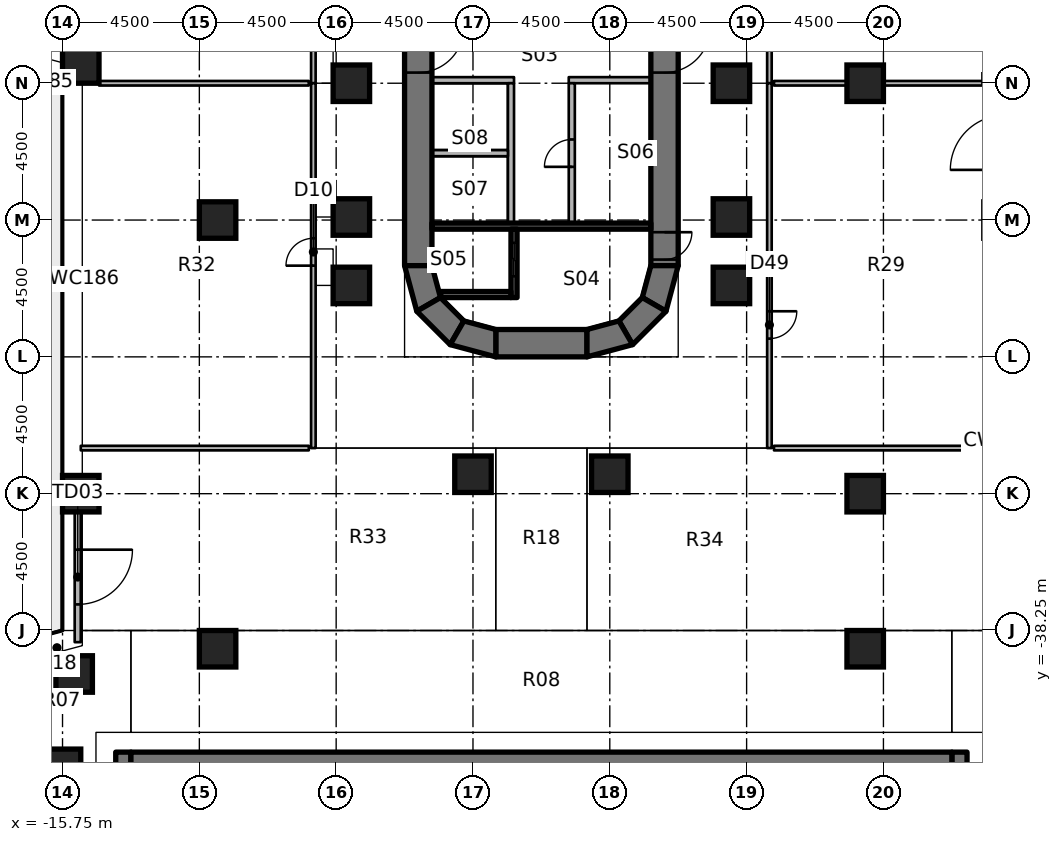
"""IFC4 building model, lengths in metres.
Left out: names, types, materials, properties, quantities, classifications, styles, units other than length and angle.
Written with IfcOpenShell. Run it as: python <this file> out.ifc"""

import sys

from ifc_helpers import new_model, si_unit, direction, frame, frame_2d, origin, origin_2d, place, context, subcontext, project, spatial, polyline, rectangle, outline, extrude, element, fill, save


model = new_model("IFC4")
c1 = context("Model", 3, precision=1e-05, world=origin(), true_north=direction((0.0, 1.0)))
c2 = subcontext(c1, "Body", "Model", "MODEL_VIEW")
j1 = project(units=[si_unit("LENGTHUNIT", "METRE"), si_unit("PLANEANGLEUNIT", "RADIAN")], contexts=[c1])
p1 = place(None, origin())
s1 = spatial("IfcSite", under=j1, at=p1, CompositionType="ELEMENT")
p2 = place(p1, origin())
s2 = spatial("IfcBuilding", under=s1, at=p2, CompositionType="ELEMENT")
p3 = place(p2, frame((0.0, 0.0, 17.0)))
s3 = spatial("IfcBuildingStorey", under=s2, at=p3, CompositionType="ELEMENT", Elevation=17.0)
for number, where, z_axis, x_axis in (
    (1, (-15.75, -42.75, 0.0), (0.0, 0.0, 1.0), (1.0, 0.0, 0.0)),
    (2, (-15.367, -39.68, 0.0), (0.0, 0.0, 1.0), (1.0, 0.0, 0.0)),
    (3, (-15.15, -33.75, 0.0), (0.0, 0.0, 1.0), (1.0, 0.0, 0.0)),
    (4, (-15.15, -19.65, 0.0), (0.0, 0.0, 1.0), (1.0, 0.0, 0.0)),
    (5, (-10.65, -38.85, 0.0), (0.0, 0.0, 1.0), (1.0, 0.0, 0.0)),
    (6, (-10.65, -24.75, 0.0), (0.0, 0.0, 1.0), (1.0, 0.0, 0.0)),
    (7, (-6.25, -26.9, 0.0), (0.0, 0.0, 1.0), (1.0, 0.0, 0.0)),
    (8, (-6.25, -24.65, 0.0), (0.0, 0.0, 1.0), (1.0, 0.0, 0.0)),
    (9, (-6.25, -20.25, 0.0), (0.0, 0.0, 1.0), (1.0, 0.0, 0.0)),
    (10, (-2.25, -33.11, 0.0), (0.0, 0.0, 1.0), (1.0, 0.0, 0.0)),
    (11, (2.25, -33.11, 0.0), (0.0, 0.0, 1.0), (1.0, 0.0, 0.0)),
    (12, (6.25, -26.9, 0.0), (0.0, 0.0, 1.0), (1.0, 0.0, 0.0)),
    (13, (6.25, -24.65, 0.0), (0.0, 0.0, 1.0), (1.0, 0.0, 0.0)),
    (14, (6.25, -20.25, 0.0), (0.0, 0.0, 1.0), (1.0, 0.0, 0.0)),
    (15, (10.65, -38.85, 0.0), (0.0, 0.0, 1.0), (1.0, 0.0, 0.0)),
    (16, (10.65, -33.75, 0.0), (0.0, 0.0, 1.0), (1.0, 0.0, 0.0)),
    (17, (10.65, -20.25, 0.0), (0.0, 0.0, 1.0), (1.0, 0.0, 0.0)),
):
    element("IfcColumn", number, at=place(p3, frame(where, z_axis=z_axis, x_axis=x_axis)), inside=s3, PredefinedType="COLUMN", context=c2, shape_type="SweptSolid", body=[
        extrude(rectangle(XDim=1.2, YDim=1.2, at=origin_2d()), origin(), (0.0, 0.0, 1.0), 4.55),
    ])
p4 = place(p3, frame((-4.05, -11.25, 0.0), z_axis=(0.0, 0.0, 1.0), x_axis=(0.0, -1.0, 0.0)))
e18 = element("IfcWall", 18, at=p4, inside=s3, PredefinedType="SHEAR", context=c2, shape_type="SweptSolid", body=[
    extrude(rectangle(XDim=15.0, YDim=0.9, at=frame_2d((7.5, 0.0))), origin(), (0.0, 0.0, 1.0), 5.0),
])
p5 = place(p4, frame((7.15, 0.0, 0.0)))
e19 = element("IfcOpeningElement", 19, at=p5, cuts=e18, PredefinedType="OPENING", context=c2, shape_type="SweptSolid", body=[
    extrude(rectangle(XDim=1.5, YDim=2.3, at=frame_2d((0.75, 1.15))), frame((0.0, 0.46, 0.0), z_axis=(0.0, -1.0, 0.0), x_axis=(1.0, 0.0, 0.0)), (0.0, 0.0, 1.0), 0.92),
])
p6 = place(p4, frame((5.55, 0.0, 0.0)))
e20 = element("IfcOpeningElement", 20, at=p6, cuts=e18, PredefinedType="OPENING", context=c2, shape_type="SweptSolid", body=[
    extrude(rectangle(XDim=1.2, YDim=2.1, at=frame_2d((0.6, 1.05))), frame((0.0, 0.46, 0.0), z_axis=(0.0, -1.0, 0.0), x_axis=(1.0, 0.0, 0.0)), (0.0, 0.0, 1.0), 0.92),
])
p7 = place(p3, frame((4.05, -11.25, 0.0), z_axis=(0.0, 0.0, 1.0), x_axis=(0.0, -1.0, 0.0)))
e21 = element("IfcWall", 21, at=p7, inside=s3, PredefinedType="SHEAR", context=c2, shape_type="SweptSolid", body=[
    extrude(rectangle(XDim=15.0, YDim=0.9, at=frame_2d((7.5, 0.0))), origin(), (0.0, 0.0, 1.0), 5.0),
])
p8 = place(p7, frame((7.15, 0.0, 0.0)))
e22 = element("IfcOpeningElement", 22, at=p8, cuts=e21, PredefinedType="OPENING", context=c2, shape_type="SweptSolid", body=[
    extrude(rectangle(XDim=1.5, YDim=2.3, at=frame_2d((0.75, 1.15))), frame((0.0, 0.46, 0.0), z_axis=(0.0, -1.0, 0.0), x_axis=(1.0, 0.0, 0.0)), (0.0, 0.0, 1.0), 0.92),
])
p9 = place(p7, frame((13.9, 0.0, 0.0)))
e23 = element("IfcOpeningElement", 23, at=p9, cuts=e21, PredefinedType="OPENING", context=c2, shape_type="SweptSolid", body=[
    extrude(rectangle(XDim=0.9, YDim=2.1, at=frame_2d((0.45, 1.05))), frame((0.0, 0.46, 0.0), z_axis=(0.0, -1.0, 0.0), x_axis=(1.0, 0.0, 0.0)), (0.0, 0.0, 1.0), 0.92),
])
p10 = place(p7, frame((1.15, 0.0, 0.0)))
e24 = element("IfcOpeningElement", 24, at=p10, cuts=e21, PredefinedType="OPENING", context=c2, shape_type="SweptSolid", body=[
    extrude(rectangle(XDim=1.2, YDim=2.1, at=frame_2d((0.6, 1.05))), frame((0.0, 0.46, 0.0), z_axis=(0.0, -1.0, 0.0), x_axis=(1.0, 0.0, 0.0)), (0.0, 0.0, 1.0), 0.92),
])
p11 = place(p3, frame((-1.5, -28.8, 0.0), z_axis=(0.0, 0.0, 1.0), x_axis=(1.0, 0.0, 0.0)))
e25 = element("IfcWall", 25, at=p11, inside=s3, PredefinedType="SHEAR", context=c2, shape_type="SweptSolid", body=[
    extrude(rectangle(XDim=3.0, YDim=0.9, at=frame_2d((1.5, 0.0))), origin(), (0.0, 0.0, 1.0), 5.0),
])
p12 = place(p3, origin())
e26 = element("IfcWall", 26, at=p12, inside=s3, PredefinedType="SHEAR", context=c2, shape_type="SweptSolid", body=[
    extrude(outline(polyline([(-4.5, -26.25), (-4.098, -27.75), (-3.319, -27.3), (-3.6, -26.25), (-4.5, -26.25)])), origin(), (0.0, 0.0, 1.0), 5.0),
])
p13 = place(p3, origin())
e27 = element("IfcWall", 27, at=p13, inside=s3, PredefinedType="SHEAR", context=c2, shape_type="SweptSolid", body=[
    extrude(outline(polyline([(-4.098, -27.75), (-3.0, -28.848), (-2.55, -28.069), (-3.319, -27.3), (-4.098, -27.75)])), origin(), (0.0, 0.0, 1.0), 5.0),
])
p14 = place(p3, origin())
e28 = element("IfcWall", 28, at=p14, inside=s3, PredefinedType="SHEAR", context=c2, shape_type="SweptSolid", body=[
    extrude(outline(polyline([(-3.0, -28.848), (-1.5, -29.25), (-1.5, -28.35), (-2.55, -28.069), (-3.0, -28.848)])), origin(), (0.0, 0.0, 1.0), 5.0),
])
p15 = place(p3, origin())
e29 = element("IfcWall", 29, at=p15, inside=s3, PredefinedType="SHEAR", context=c2, shape_type="SweptSolid", body=[
    extrude(outline(polyline([(4.5, -26.25), (4.098, -27.75), (3.319, -27.3), (3.6, -26.25), (4.5, -26.25)])), origin(), (0.0, 0.0, 1.0), 5.0),
])
p16 = place(p3, origin())
e30 = element("IfcWall", 30, at=p16, inside=s3, PredefinedType="SHEAR", context=c2, shape_type="SweptSolid", body=[
    extrude(outline(polyline([(4.098, -27.75), (3.0, -28.848), (2.55, -28.069), (3.319, -27.3), (4.098, -27.75)])), origin(), (0.0, 0.0, 1.0), 5.0),
])
p17 = place(p3, origin())
e31 = element("IfcWall", 31, at=p17, inside=s3, PredefinedType="SHEAR", context=c2, shape_type="SweptSolid", body=[
    extrude(outline(polyline([(3.0, -28.848), (1.5, -29.25), (1.5, -28.35), (2.55, -28.069), (3.0, -28.848)])), origin(), (0.0, 0.0, 1.0), 5.0),
])
for number, where, z_axis, x_axis in (
    (32, (-13.75, -63.5, 0.0), (0.0, 0.0, 1.0), (0.0, 1.0, 0.0)),
    (33, (13.75, -63.5, 0.0), (0.0, 0.0, 1.0), (0.0, 1.0, 0.0)),
):
    element("IfcWall", number, at=place(p3, frame(where, z_axis=z_axis, x_axis=x_axis)), inside=s3, PredefinedType="SOLIDWALL", context=c2, shape_type="SweptSolid", body=[
        extrude(rectangle(XDim=21.25, YDim=0.5, at=frame_2d((10.625, 0.0))), origin(), (0.0, 0.0, 1.0), 4.55),
    ])
p18 = place(p3, frame((-13.5, -42.5, 0.0), z_axis=(0.0, 0.0, 1.0), x_axis=(1.0, 0.0, 0.0)))
e34 = element("IfcWall", 34, at=p18, inside=s3, PredefinedType="SOLIDWALL", context=c2, shape_type="SweptSolid", body=[
    extrude(rectangle(XDim=27.0, YDim=0.5, at=frame_2d((13.5, 0.0))), origin(), (0.0, 0.0, 1.0), 4.55),
])
p19 = place(p3, frame((-15.25, -34.35, 0.0), z_axis=(0.0, 0.0, 1.0), x_axis=(0.0, -1.0, 0.0)))
e35 = element("IfcWall", 35, at=p19, inside=s3, PredefinedType="SOLIDWALL", context=c2, shape_type="SweptSolid", body=[
    extrude(rectangle(XDim=4.283, YDim=0.2, at=frame_2d((2.142, 0.0))), origin(), (0.0, 0.0, 1.0), 4.55),
])
p20 = place(p19, frame((1.242, 0.0, 0.0)))
e36 = element("IfcOpeningElement", 36, at=p20, cuts=e35, PredefinedType="OPENING", context=c2, shape_type="SweptSolid", body=[
    extrude(rectangle(XDim=1.8, YDim=2.4, at=frame_2d((0.9, 1.2))), frame((0.0, 0.11, 0.0), z_axis=(0.0, -1.0, 0.0), x_axis=(1.0, 0.0, 0.0)), (0.0, 0.0, 1.0), 0.22),
])
p21 = place(p3, frame((3.6, -24.95, 0.0), z_axis=(0.0, 0.0, 1.0), x_axis=(-1.0, 0.0, 0.0)))
e37 = element("IfcWall", 37, at=p21, inside=s3, PredefinedType="SHEAR", context=c2, shape_type="SweptSolid", body=[
    extrude(rectangle(XDim=7.2, YDim=0.2, at=frame_2d((3.6, 0.0))), origin(), (0.0, 0.0, 1.0), 4.55),
])
p22 = place(p3, frame((-0.9, -27.3, 0.0), z_axis=(0.0, 0.0, 1.0), x_axis=(0.0, 1.0, 0.0)))
e38 = element("IfcWall", 38, at=p22, inside=s3, PredefinedType="SHEAR", context=c2, shape_type="SweptSolid", body=[
    extrude(rectangle(XDim=2.25, YDim=0.2, at=frame_2d((1.125, 0.0))), origin(), (0.0, 0.0, 1.0), 4.55),
])
p23 = place(p22, frame((0.7, 0.0, 0.0)))
e39 = element("IfcOpeningElement", 39, at=p23, cuts=e38, PredefinedType="OPENING", context=c2, shape_type="SweptSolid", body=[
    extrude(rectangle(XDim=1.1, YDim=2.3, at=frame_2d((0.55, 1.15))), frame((0.0, 0.11, 0.0), z_axis=(0.0, -1.0, 0.0), x_axis=(1.0, 0.0, 0.0)), (0.0, 0.0, 1.0), 0.22),
])
p24 = place(p3, origin())
e40 = element("IfcWall", 40, at=p24, inside=s3, PredefinedType="SHEAR", context=c2, shape_type="SweptSolid", body=[
    extrude(outline(polyline([(-1.0, -27.1), (-3.341, -27.1), (-3.291, -27.284), (-3.275, -27.3), (-1.0, -27.3), (-1.0, -27.1)])), origin(), (0.0, 0.0, 1.0), 4.55),
])
p25 = place(p3, frame((3.6, -20.15, 0.0), z_axis=(0.0, 0.0, 1.0), x_axis=(-1.0, 0.0, 0.0)))
e41 = element("IfcWall", 41, at=p25, inside=s3, PredefinedType="PARTITIONING", context=c2, shape_type="SweptSolid", body=[
    extrude(rectangle(XDim=2.7, YDim=0.2, at=frame_2d((1.35, 0.0))), origin(), (0.0, 0.0, 1.0), 4.55),
])
p26 = place(p3, frame((1.0, -24.85, 0.0), z_axis=(0.0, 0.0, 1.0), x_axis=(0.0, 1.0, 0.0)))
e42 = element("IfcWall", 42, at=p26, inside=s3, PredefinedType="PARTITIONING", context=c2, shape_type="SweptSolid", body=[
    extrude(rectangle(XDim=4.6, YDim=0.2, at=frame_2d((2.3, 0.0))), origin(), (0.0, 0.0, 1.0), 4.55),
])
p27 = place(p26, frame((1.85, 0.0, 0.0)))
e43 = element("IfcOpeningElement", 43, at=p27, cuts=e42, PredefinedType="OPENING", context=c2, shape_type="SweptSolid", body=[
    extrude(rectangle(XDim=0.9, YDim=2.1, at=frame_2d((0.45, 1.05))), frame((0.0, 0.11, 0.0), z_axis=(0.0, -1.0, 0.0), x_axis=(1.0, 0.0, 0.0)), (0.0, 0.0, 1.0), 0.22),
])
p28 = place(p3, frame((-0.9, -20.15, 0.0), z_axis=(0.0, 0.0, 1.0), x_axis=(-1.0, 0.0, 0.0)))
e44 = element("IfcWall", 44, at=p28, inside=s3, PredefinedType="PARTITIONING", context=c2, shape_type="SweptSolid", body=[
    extrude(rectangle(XDim=2.7, YDim=0.2, at=frame_2d((1.35, 0.0))), origin(), (0.0, 0.0, 1.0), 4.55),
])
p29 = place(p3, frame((-1.0, -24.85, 0.0), z_axis=(0.0, 0.0, 1.0), x_axis=(0.0, 1.0, 0.0)))
e45 = element("IfcWall", 45, at=p29, inside=s3, PredefinedType="PARTITIONING", context=c2, shape_type="SweptSolid", body=[
    extrude(rectangle(XDim=4.6, YDim=0.2, at=frame_2d((2.3, 0.0))), origin(), (0.0, 0.0, 1.0), 4.55),
])
p30 = place(p3, frame((-1.1, -22.55, 0.0), z_axis=(0.0, 0.0, 1.0), x_axis=(-1.0, 0.0, 0.0)))
e46 = element("IfcWall", 46, at=p30, inside=s3, PredefinedType="PARTITIONING", context=c2, shape_type="SweptSolid", body=[
    extrude(rectangle(XDim=2.5, YDim=0.2, at=frame_2d((1.25, 0.0))), origin(), (0.0, 0.0, 1.0), 4.55),
])
p31 = place(p3, frame((7.5, -8.25, 0.0), z_axis=(0.0, 0.0, 1.0), x_axis=(0.0, -1.0, 0.0)))
e47 = element("IfcWall", 47, at=p31, inside=s3, PredefinedType="PARTITIONING", context=c2, shape_type="SweptSolid", body=[
    extrude(rectangle(XDim=12.0, YDim=0.15, at=frame_2d((6.0, 0.0))), origin(), (0.0, 0.0, 1.0), 4.55),
])
p32 = place(p3, frame((7.5, -20.25, 0.0), z_axis=(0.0, 0.0, 1.0), x_axis=(0.0, -1.0, 0.0)))
e48 = element("IfcWall", 48, at=p32, inside=s3, PredefinedType="PARTITIONING", context=c2, shape_type="SweptSolid", body=[
    extrude(rectangle(XDim=12.0, YDim=0.15, at=frame_2d((6.0, 0.0))), origin(), (0.0, 0.0, 1.0), 4.55),
])
p33 = place(p32, frame((7.5, 0.0, 0.0)))
e49 = element("IfcOpeningElement", 49, at=p33, cuts=e48, PredefinedType="OPENING", context=c2, shape_type="SweptSolid", body=[
    extrude(rectangle(XDim=0.9, YDim=2.1, at=frame_2d((0.45, 1.05))), frame((0.0, 0.085, 0.0), z_axis=(0.0, -1.0, 0.0), x_axis=(1.0, 0.0, 0.0)), (0.0, 0.0, 1.0), 0.17),
])
p34 = place(p3, frame((-7.5, -20.25, 0.0), z_axis=(0.0, 0.0, 1.0), x_axis=(0.0, 1.0, 0.0)))
e50 = element("IfcWall", 50, at=p34, inside=s3, PredefinedType="PARTITIONING", context=c2, shape_type="SweptSolid", body=[
    extrude(rectangle(XDim=12.0, YDim=0.15, at=frame_2d((6.0, 0.0))), origin(), (0.0, 0.0, 1.0), 4.55),
])
p35 = place(p34, frame((5.5, 0.0, 0.0)))
e51 = element("IfcOpeningElement", 51, at=p35, cuts=e50, PredefinedType="OPENING", context=c2, shape_type="SweptSolid", body=[
    extrude(rectangle(XDim=1.0, YDim=2.1, at=frame_2d((0.5, 1.05))), frame((0.0, 0.085, 0.0), z_axis=(0.0, -1.0, 0.0), x_axis=(1.0, 0.0, 0.0)), (0.0, 0.0, 1.0), 0.17),
])
p36 = place(p3, frame((-7.5, -32.25, 0.0), z_axis=(0.0, 0.0, 1.0), x_axis=(0.0, 1.0, 0.0)))
e52 = element("IfcWall", 52, at=p36, inside=s3, PredefinedType="PARTITIONING", context=c2, shape_type="SweptSolid", body=[
    extrude(rectangle(XDim=12.0, YDim=0.15, at=frame_2d((6.0, 0.0))), origin(), (0.0, 0.0, 1.0), 4.55),
])
p37 = place(p36, frame((6.0, 0.0, 0.0)))
e53 = element("IfcOpeningElement", 53, at=p37, cuts=e52, PredefinedType="OPENING", context=c2, shape_type="SweptSolid", body=[
    extrude(rectangle(XDim=0.9, YDim=2.1, at=frame_2d((0.45, 1.05))), frame((0.0, 0.085, 0.0), z_axis=(0.0, -1.0, 0.0), x_axis=(1.0, 0.0, 0.0)), (0.0, 0.0, 1.0), 0.17),
])
p38 = place(p3, frame((14.55, -20.25, 0.0), z_axis=(0.0, 0.0, 1.0), x_axis=(-1.0, 0.0, 0.0)))
e54 = element("IfcWall", 54, at=p38, inside=s3, PredefinedType="PARTITIONING", context=c2, shape_type="SweptSolid", body=[
    extrude(rectangle(XDim=3.3, YDim=0.15, at=frame_2d((1.65, 0.0))), origin(), (0.0, 0.0, 1.0), 4.55),
])
p39 = place(p3, frame((10.05, -20.25, 0.0), z_axis=(0.0, 0.0, 1.0), x_axis=(-1.0, 0.0, 0.0)))
e55 = element("IfcWall", 55, at=p39, inside=s3, PredefinedType="PARTITIONING", context=c2, shape_type="SweptSolid", body=[
    extrude(rectangle(XDim=2.4, YDim=0.15, at=frame_2d((1.2, 0.0))), origin(), (0.0, 0.0, 1.0), 4.55),
])
p40 = place(p3, frame((15.15, -32.25, 0.0), z_axis=(0.0, 0.0, 1.0), x_axis=(-1.0, 0.0, 0.0)))
e56 = element("IfcWall", 56, at=p40, inside=s3, PredefinedType="PARTITIONING", context=c2, shape_type="SweptSolid", body=[
    extrude(rectangle(XDim=7.5, YDim=0.15, at=frame_2d((3.75, 0.0))), origin(), (0.0, 0.0, 1.0), 4.55),
])
p41 = place(p3, frame((-7.65, -20.25, 0.0), z_axis=(0.0, 0.0, 1.0), x_axis=(-1.0, 0.0, 0.0)))
e57 = element("IfcWall", 57, at=p41, inside=s3, PredefinedType="PARTITIONING", context=c2, shape_type="SweptSolid", body=[
    extrude(rectangle(XDim=6.9, YDim=0.15, at=frame_2d((3.45, 0.0))), origin(), (0.0, 0.0, 1.0), 4.55),
])
p42 = place(p3, frame((-7.65, -32.25, 0.0), z_axis=(0.0, 0.0, 1.0), x_axis=(-1.0, 0.0, 0.0)))
e58 = element("IfcWall", 58, at=p42, inside=s3, PredefinedType="PARTITIONING", context=c2, shape_type="SweptSolid", body=[
    extrude(rectangle(XDim=7.5, YDim=0.15, at=frame_2d((3.75, 0.0))), origin(), (0.0, 0.0, 1.0), 4.55),
])
p43 = place(p20, origin())
e59 = element("IfcDoor", 59, at=p43, inside=s3, OperationType="SINGLE_SWING_LEFT", PredefinedType="DOOR", context=c2, shape_type="SweptSolid", body=[
    extrude(rectangle(XDim=1.8, YDim=2.4, at=frame_2d((0.9, 1.2))), frame((0.0, 0.025, 0.0), z_axis=(0.0, -1.0, 0.0), x_axis=(1.0, 0.0, 0.0)), (0.0, 0.0, 1.0), 0.05),
])
fill(e36, e59)
p44 = place(p8, origin())
e60 = element("IfcDoor", 60, at=p44, inside=s3, OperationType="DOUBLE_DOOR_SINGLE_SWING", PredefinedType="DOOR", context=c2, shape_type="SweptSolid", body=[
    extrude(rectangle(XDim=1.5, YDim=2.3, at=frame_2d((0.75, 1.15))), frame((0.0, 0.025, 0.0), z_axis=(0.0, -1.0, 0.0), x_axis=(1.0, 0.0, 0.0)), (0.0, 0.0, 1.0), 0.05),
])
fill(e22, e60)
p45 = place(p5, origin())
e61 = element("IfcDoor", 61, at=p45, inside=s3, OperationType="DOUBLE_DOOR_SINGLE_SWING", PredefinedType="DOOR", context=c2, shape_type="SweptSolid", body=[
    extrude(rectangle(XDim=1.5, YDim=2.3, at=frame_2d((0.75, 1.15))), frame((0.0, 0.025, 0.0), z_axis=(0.0, -1.0, 0.0), x_axis=(1.0, 0.0, 0.0)), (0.0, 0.0, 1.0), 0.05),
])
fill(e19, e61)
p46 = place(p9, origin())
e62 = element("IfcDoor", 62, at=p46, inside=s3, OperationType="SINGLE_SWING_LEFT", PredefinedType="DOOR", context=c2, shape_type="SweptSolid", body=[
    extrude(rectangle(XDim=0.9, YDim=2.1, at=frame_2d((0.45, 1.05))), frame((0.0, 0.025, 0.0), z_axis=(0.0, -1.0, 0.0), x_axis=(1.0, 0.0, 0.0)), (0.0, 0.0, 1.0), 0.05),
])
fill(e23, e62)
p47 = place(p23, origin())
e63 = element("IfcDoor", 63, at=p47, inside=s3, OperationType="DOUBLE_DOOR_SLIDING", PredefinedType="DOOR", context=c2, shape_type="SweptSolid", body=[
    extrude(rectangle(XDim=1.1, YDim=2.3, at=frame_2d((0.55, 1.15))), frame((0.0, 0.025, 0.0), z_axis=(0.0, -1.0, 0.0), x_axis=(1.0, 0.0, 0.0)), (0.0, 0.0, 1.0), 0.05),
])
fill(e39, e63)
p48 = place(p27, origin())
e64 = element("IfcDoor", 64, at=p48, inside=s3, OperationType="SINGLE_SWING_LEFT", PredefinedType="DOOR", context=c2, shape_type="SweptSolid", body=[
    extrude(rectangle(XDim=0.9, YDim=2.1, at=frame_2d((0.45, 1.05))), frame((0.0, 0.025, 0.0), z_axis=(0.0, -1.0, 0.0), x_axis=(1.0, 0.0, 0.0)), (0.0, 0.0, 1.0), 0.05),
])
fill(e43, e64)
p49 = place(p33, origin())
e65 = element("IfcDoor", 65, at=p49, inside=s3, OperationType="SINGLE_SWING_LEFT", PredefinedType="DOOR", context=c2, shape_type="SweptSolid", body=[
    extrude(rectangle(XDim=0.9, YDim=2.1, at=frame_2d((0.45, 1.05))), frame((0.0, 0.025, 0.0), z_axis=(0.0, -1.0, 0.0), x_axis=(1.0, 0.0, 0.0)), (0.0, 0.0, 1.0), 0.05),
])
fill(e49, e65)
p50 = place(p37, origin())
e66 = element("IfcDoor", 66, at=p50, inside=s3, OperationType="SINGLE_SWING_LEFT", PredefinedType="DOOR", context=c2, shape_type="SweptSolid", body=[
    extrude(rectangle(XDim=0.9, YDim=2.1, at=frame_2d((0.45, 1.05))), frame((0.0, 0.025, 0.0), z_axis=(0.0, -1.0, 0.0), x_axis=(1.0, 0.0, 0.0)), (0.0, 0.0, 1.0), 0.05),
])
fill(e53, e66)
save(model, sys.argv[1])
